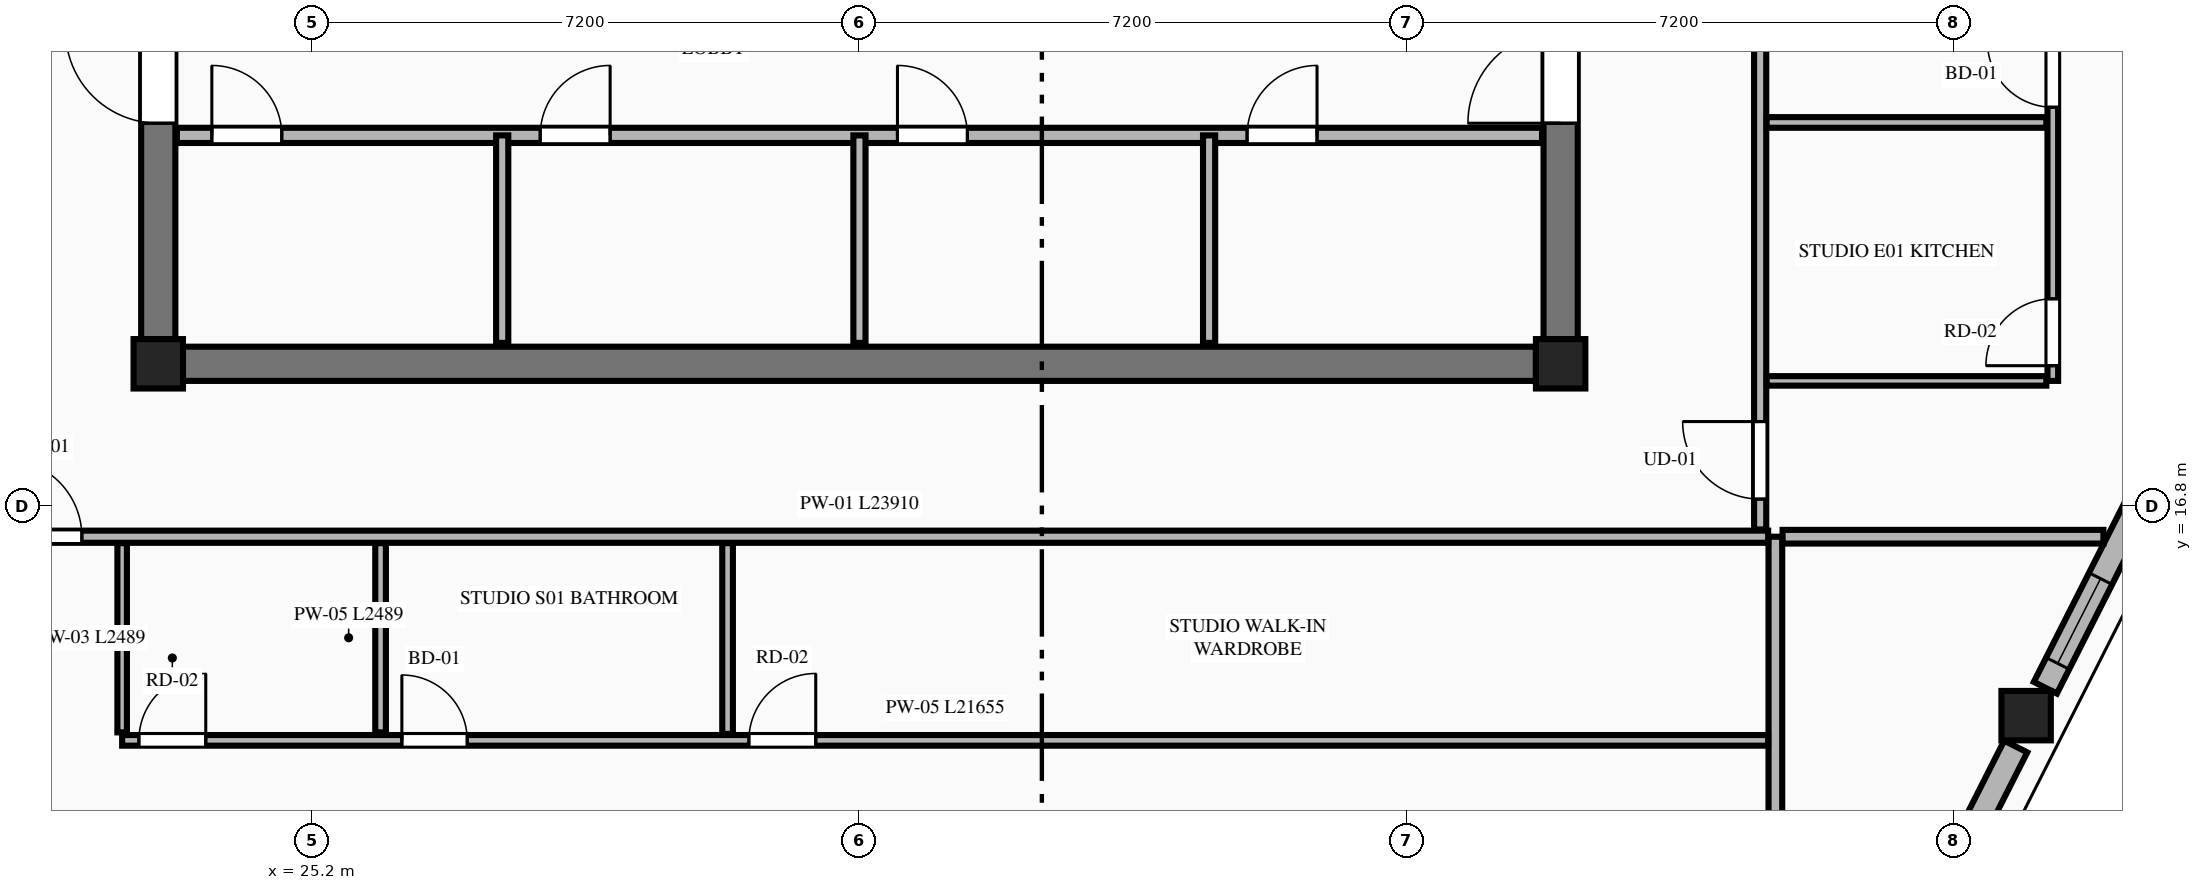
"""IFC4 building model, lengths in metres.
Left out: names, types, materials, properties, quantities, classifications, styles, units other than length and angle.
Written with IfcOpenShell. Run it as: python <this file> out.ifc"""

import sys

from ifc_helpers import new_model, si_unit, direction, frame, frame_2d, origin, origin_2d, place, context, subcontext, project, spatial, rectangle, extrude, element, fill, save


model = new_model("IFC4")
c1 = context("Model", 3, precision=1e-05, world=origin(), true_north=direction((0.0, 1.0)))
c2 = subcontext(c1, "Body", "Model", "MODEL_VIEW")
j1 = project(units=[si_unit("LENGTHUNIT", "METRE"), si_unit("PLANEANGLEUNIT", "RADIAN")], contexts=[c1])
p1 = place(None, origin())
s1 = spatial("IfcSite", under=j1, at=p1, CompositionType="ELEMENT")
p2 = place(p1, origin())
s2 = spatial("IfcBuilding", under=s1, at=p2, CompositionType="ELEMENT")
p3 = place(p2, frame((0.0, 0.0, 267.15)))
s3 = spatial("IfcBuildingStorey", under=s2, at=p3, CompositionType="ELEMENT", Elevation=267.15)
for number, where, z_axis, x_axis in (
    (1, (23.175, 18.675, 0.0), (0.0, 0.0, 1.0), (1.0, 0.0, 0.0)),
    (2, (41.625, 18.675, 0.0), (0.0, 0.0, 1.0), (1.0, 0.0, 0.0)),
):
    element("IfcColumn", number, at=place(p3, frame(where, z_axis=z_axis, x_axis=x_axis)), inside=s3, PredefinedType="COLUMN", context=c2, shape_type="SweptSolid", body=[
        extrude(rectangle(XDim=0.65, YDim=0.65, at=origin_2d()), origin(), (0.0, 0.0, 1.0), 3.65),
    ])
p4 = place(p3, frame((23.5, 18.675, 0.0), z_axis=(0.0, 0.0, 1.0), x_axis=(1.0, 0.0, 0.0)))
e3 = element("IfcWall", 3, at=p4, inside=s3, PredefinedType="SHEAR", context=c2, shape_type="SweptSolid", body=[
    extrude(rectangle(XDim=17.8, YDim=0.45, at=frame_2d((8.9, 0.0))), origin(), (0.0, 0.0, 1.0), 3.45),
])
p5 = place(p3, frame((23.175, 19.0, 0.0), z_axis=(0.0, 0.0, 1.0), x_axis=(0.0, 1.0, 0.0)))
e4 = element("IfcWall", 4, at=p5, inside=s3, PredefinedType="SHEAR", context=c2, shape_type="SweptSolid", body=[
    extrude(rectangle(XDim=13.8, YDim=0.45, at=frame_2d((6.9, 0.0))), origin(), (0.0, 0.0, 1.0), 3.45),
])
p6 = place(p5, frame((2.84, 0.0, 0.0)))
e5 = element("IfcOpeningElement", 5, at=p6, cuts=e4, PredefinedType="OPENING", context=c2, shape_type="SweptSolid", body=[
    extrude(rectangle(XDim=1.22, YDim=2.25, at=frame_2d((0.61, 1.125))), frame((0.0, 0.235, 0.0), z_axis=(0.0, -1.0, 0.0), x_axis=(1.0, 0.0, 0.0)), (0.0, 0.0, 1.0), 0.47),
])
p7 = place(p3, frame((41.625, 19.0, 0.0), z_axis=(0.0, 0.0, 1.0), x_axis=(0.0, 1.0, 0.0)))
e6 = element("IfcWall", 6, at=p7, inside=s3, PredefinedType="SHEAR", context=c2, shape_type="SweptSolid", body=[
    extrude(rectangle(XDim=13.8, YDim=0.45, at=frame_2d((6.9, 0.0))), origin(), (0.0, 0.0, 1.0), 3.45),
])
p8 = place(p7, frame((2.84, 0.0, 0.0)))
e7 = element("IfcOpeningElement", 7, at=p8, cuts=e6, PredefinedType="OPENING", context=c2, shape_type="SweptSolid", body=[
    extrude(rectangle(XDim=1.22, YDim=2.25, at=frame_2d((0.61, 1.125))), frame((0.0, 0.235, 0.0), z_axis=(0.0, -1.0, 0.0), x_axis=(1.0, 0.0, 0.0)), (0.0, 0.0, 1.0), 0.47),
])
p9 = place(p3, frame((47.749, 14.046, 0.0), z_axis=(0.0, 0.0, 1.0), x_axis=(1.0, 0.0, 0.0)))
e8 = element("IfcColumn", 8, at=p9, inside=s3, PredefinedType="COLUMN", context=c2, shape_type="SweptSolid", body=[
    extrude(rectangle(XDim=0.65, YDim=0.65, at=origin_2d()), origin(), (0.0, 0.0, 1.0), 3.65),
])
p10 = place(p3, frame((23.42, 21.68, 0.0), z_axis=(0.0, 0.0, 1.0), x_axis=(1.0, 0.0, 0.0)))
e9 = element("IfcWall", 9, at=p10, inside=s3, PredefinedType="PLUMBINGWALL", context=c2, shape_type="SweptSolid", body=[
    extrude(rectangle(XDim=17.96, YDim=0.2, at=frame_2d((8.98, 0.0))), origin(), (0.0, 0.0, 1.0), 3.45),
])
p11 = place(p10, frame((0.46, 0.0, 0.0)))
e10 = element("IfcOpeningElement", 10, at=p11, cuts=e9, PredefinedType="OPENING", context=c2, shape_type="SweptSolid", body=[
    extrude(rectangle(XDim=0.92, YDim=2.15, at=frame_2d((0.46, 1.075))), frame((0.0, 0.11, 0.0), z_axis=(0.0, -1.0, 0.0), x_axis=(1.0, 0.0, 0.0)), (0.0, 0.0, 1.0), 0.22),
])
p12 = place(p10, frame((4.78, 0.0, 0.0)))
e11 = element("IfcOpeningElement", 11, at=p12, cuts=e9, PredefinedType="OPENING", context=c2, shape_type="SweptSolid", body=[
    extrude(rectangle(XDim=0.92, YDim=2.15, at=frame_2d((0.46, 1.075))), frame((0.0, 0.11, 0.0), z_axis=(0.0, -1.0, 0.0), x_axis=(1.0, 0.0, 0.0)), (0.0, 0.0, 1.0), 0.22),
])
p13 = place(p10, frame((9.48, 0.0, 0.0)))
e12 = element("IfcOpeningElement", 12, at=p13, cuts=e9, PredefinedType="OPENING", context=c2, shape_type="SweptSolid", body=[
    extrude(rectangle(XDim=0.92, YDim=2.15, at=frame_2d((0.46, 1.075))), frame((0.0, 0.11, 0.0), z_axis=(0.0, -1.0, 0.0), x_axis=(1.0, 0.0, 0.0)), (0.0, 0.0, 1.0), 0.22),
])
p14 = place(p10, frame((14.08, 0.0, 0.0)))
e13 = element("IfcOpeningElement", 13, at=p14, cuts=e9, PredefinedType="OPENING", context=c2, shape_type="SweptSolid", body=[
    extrude(rectangle(XDim=0.92, YDim=2.15, at=frame_2d((0.46, 1.075))), frame((0.0, 0.11, 0.0), z_axis=(0.0, -1.0, 0.0), x_axis=(1.0, 0.0, 0.0)), (0.0, 0.0, 1.0), 0.22),
])
for number, where, z_axis, x_axis in (
    (14, (27.7, 18.95, 0.0), (0.0, 0.0, 1.0), (0.0, 1.0, 0.0)),
    (15, (32.4, 18.95, 0.0), (0.0, 0.0, 1.0), (0.0, 1.0, 0.0)),
    (16, (37.0, 18.95, 0.0), (0.0, 0.0, 1.0), (0.0, 1.0, 0.0)),
):
    element("IfcWall", number, at=place(p3, frame(where, z_axis=z_axis, x_axis=x_axis)), inside=s3, PredefinedType="PARTITIONING", context=c2, shape_type="SweptSolid", body=[
        extrude(rectangle(XDim=2.73, YDim=0.16, at=frame_2d((1.365, 0.0))), origin(), (0.0, 0.0, 1.0), 3.45),
    ])
p15 = place(p3, frame((45.556, 9.577, 0.0), z_axis=(0.0, 0.0, 1.0), x_axis=(0.45154039276, 0.892250678737, 0.0)))
e17 = element("IfcWall", 17, at=p15, inside=s3, PredefinedType="STANDARD", context=c2, shape_type="SweptSolid", body=[
    extrude(rectangle(XDim=4.554, YDim=0.34, at=frame_2d((2.277, 0.0))), origin(), (0.0, 0.0, 1.0), 2.983),
])
p16 = place(p15, frame((1.577, 0.0, 0.75)))
e18 = element("IfcOpeningElement", 18, at=p16, cuts=e17, PredefinedType="OPENING", context=c2, shape_type="SweptSolid", body=[
    extrude(rectangle(XDim=1.4, YDim=2.05, at=frame_2d((0.7, 1.025))), frame((0.0, 0.18, 0.0), z_axis=(0.0, -1.0, 0.0), x_axis=(1.0, 0.0, 0.0)), (0.0, 0.0, 1.0), 0.36),
])
p17 = place(p3, frame((48.002, 14.413, 0.0), z_axis=(0.0, 0.0, 1.0), x_axis=(0.451468341582, 0.892287137949, 0.0)))
e19 = element("IfcWall", 19, at=p17, inside=s3, PredefinedType="STANDARD", context=c2, shape_type="SweptSolid", body=[
    extrude(rectangle(XDim=4.723, YDim=0.34, at=frame_2d((2.361, 0.0))), origin(), (0.0, 0.0, 1.0), 2.983),
])
p18 = place(p17, frame((0.359, 0.0, 0.75)))
e20 = element("IfcOpeningElement", 20, at=p18, cuts=e19, PredefinedType="OPENING", context=c2, shape_type="SweptSolid", body=[
    extrude(rectangle(XDim=1.25, YDim=1.95, at=frame_2d((0.625, 0.975))), frame((0.0, 0.18, 0.0), z_axis=(0.0, -1.0, 0.0), x_axis=(1.0, 0.0, 0.0)), (0.0, 0.0, 1.0), 0.36),
])
p19 = place(p17, frame((2.946, 0.0, 0.75)))
e21 = element("IfcOpeningElement", 21, at=p19, cuts=e19, PredefinedType="OPENING", context=c2, shape_type="SweptSolid", body=[
    extrude(rectangle(XDim=1.1, YDim=2.0, at=frame_2d((0.55, 1.0))), frame((0.0, 0.18, 0.0), z_axis=(0.0, -1.0, 0.0), x_axis=(1.0, 0.0, 0.0)), (0.0, 0.0, 1.0), 0.36),
])
p20 = place(p3, frame((44.45, 8.119, 0.0), z_axis=(0.0, 0.0, 1.0), x_axis=(0.0, 1.0, 0.0)))
e22 = element("IfcWall", 22, at=p20, inside=s3, PredefinedType="PARTITIONING", context=c2, shape_type="SweptSolid", body=[
    extrude(rectangle(XDim=8.281, YDim=0.18, at=frame_2d((4.141, 0.0))), origin(), (0.0, 0.0, 1.0), 3.45),
])
p21 = place(p3, frame((20.445, 16.4, 0.0), z_axis=(0.0, 0.0, 1.0), x_axis=(1.0, 0.0, 0.0)))
e23 = element("IfcWall", 23, at=p21, inside=s3, PredefinedType="PARTITIONING", context=c2, shape_type="SweptSolid", body=[
    extrude(rectangle(XDim=23.91, YDim=0.16, at=frame_2d((11.955, 0.0))), origin(), (0.0, 0.0, 1.0), 3.45),
])
p22 = place(p21, frame((0.705, 0.0, 0.0)))
e24 = element("IfcOpeningElement", 24, at=p22, cuts=e23, PredefinedType="OPENING", context=c2, shape_type="SweptSolid", body=[
    extrude(rectangle(XDim=1.02, YDim=2.25, at=frame_2d((0.51, 1.125))), frame((0.0, 0.09, 0.0), z_axis=(0.0, -1.0, 0.0), x_axis=(1.0, 0.0, 0.0)), (0.0, 0.0, 1.0), 0.18),
])
p23 = place(p3, frame((22.7, 13.826, 0.0), z_axis=(0.0, 0.0, 1.0), x_axis=(0.0, 1.0, 0.0)))
e25 = element("IfcWall", 25, at=p23, inside=s3, PredefinedType="PARTITIONING", context=c2, shape_type="SweptSolid", body=[
    extrude(rectangle(XDim=2.489, YDim=0.125, at=frame_2d((1.245, 0.0))), origin(), (0.0, 0.0, 1.0), 2.907),
])
p24 = place(p3, frame((22.7, 13.721, 0.0), z_axis=(0.0, 0.0, 1.0), x_axis=(1.0, 0.0, 0.0)))
e26 = element("IfcWall", 26, at=p24, inside=s3, PredefinedType="PLUMBINGWALL", context=c2, shape_type="SweptSolid", body=[
    extrude(rectangle(XDim=21.655, YDim=0.14, at=frame_2d((10.828, 0.0))), origin(), (0.0, 0.0, 1.0), 3.45),
])
p25 = place(p24, frame((3.68, 0.0, 0.0)))
e27 = element("IfcOpeningElement", 27, at=p25, cuts=e26, PredefinedType="OPENING", context=c2, shape_type="SweptSolid", body=[
    extrude(rectangle(XDim=0.86, YDim=2.1, at=frame_2d((0.43, 1.05))), frame((0.0, 0.08, 0.0), z_axis=(0.0, -1.0, 0.0), x_axis=(1.0, 0.0, 0.0)), (0.0, 0.0, 1.0), 0.16),
])
p26 = place(p24, frame((8.245, 0.0, 0.0)))
e28 = element("IfcOpeningElement", 28, at=p26, cuts=e26, PredefinedType="OPENING", context=c2, shape_type="SweptSolid", body=[
    extrude(rectangle(XDim=0.88, YDim=2.15, at=frame_2d((0.44, 1.075))), frame((0.0, 0.08, 0.0), z_axis=(0.0, -1.0, 0.0), x_axis=(1.0, 0.0, 0.0)), (0.0, 0.0, 1.0), 0.16),
])
p27 = place(p24, frame((0.22, 0.0, 0.0)))
e29 = element("IfcOpeningElement", 29, at=p27, cuts=e26, PredefinedType="OPENING", context=c2, shape_type="SweptSolid", body=[
    extrude(rectangle(XDim=0.88, YDim=2.15, at=frame_2d((0.44, 1.075))), frame((0.0, 0.08, 0.0), z_axis=(0.0, -1.0, 0.0), x_axis=(1.0, 0.0, 0.0)), (0.0, 0.0, 1.0), 0.16),
])
p28 = place(p3, frame((26.1, 13.826, 0.0), z_axis=(0.0, 0.0, 1.0), x_axis=(0.0, 1.0, 0.0)))
e30 = element("IfcWall", 30, at=p28, inside=s3, PredefinedType="PLUMBINGWALL", context=c2, shape_type="SweptSolid", body=[
    extrude(rectangle(XDim=2.489, YDim=0.14, at=frame_2d((1.245, 0.0))), origin(), (0.0, 0.0, 1.0), 3.45),
])
p29 = place(p3, frame((30.665, 13.806, 0.0), z_axis=(0.0, 0.0, 1.0), x_axis=(0.0, 1.0, 0.0)))
e31 = element("IfcWall", 31, at=p29, inside=s3, PredefinedType="PLUMBINGWALL", context=c2, shape_type="SweptSolid", body=[
    extrude(rectangle(XDim=2.509, YDim=0.14, at=frame_2d((1.254, 0.0))), origin(), (0.0, 0.0, 1.0), 3.45),
])
p30 = place(p3, frame((44.545, 16.4, 0.0), z_axis=(0.0, 0.0, 1.0), x_axis=(1.0, 0.0, 0.0)))
e32 = element("IfcWall", 32, at=p30, inside=s3, PredefinedType="PARTITIONING", context=c2, shape_type="SweptSolid", body=[
    extrude(rectangle(XDim=4.221, YDim=0.18, at=frame_2d((2.111, 0.0))), origin(), (0.0, 0.0, 1.0), 3.45),
])
p31 = place(p3, frame((44.25, 16.495, 0.0), z_axis=(0.0, 0.0, 1.0), x_axis=(0.0, 1.0, 0.0)))
e33 = element("IfcWall", 33, at=p31, inside=s3, PredefinedType="PARTITIONING", context=c2, shape_type="SweptSolid", body=[
    extrude(rectangle(XDim=18.41, YDim=0.16, at=frame_2d((9.205, 0.0))), origin(), (0.0, 0.0, 1.0), 3.137),
])
p32 = place(p31, frame((0.4, 0.0, 0.0)))
e34 = element("IfcOpeningElement", 34, at=p32, cuts=e33, PredefinedType="OPENING", context=c2, shape_type="SweptSolid", body=[
    extrude(rectangle(XDim=1.02, YDim=2.25, at=frame_2d((0.51, 1.125))), frame((0.0, 0.09, 0.0), z_axis=(0.0, -1.0, 0.0), x_axis=(1.0, 0.0, 0.0)), (0.0, 0.0, 1.0), 0.18),
])
p33 = place(p3, frame((44.335, 18.45, 0.0), z_axis=(0.0, 0.0, 1.0), x_axis=(1.0, 0.0, 0.0)))
e35 = element("IfcWall", 35, at=p33, inside=s3, PredefinedType="PARTITIONING", context=c2, shape_type="SweptSolid", body=[
    extrude(rectangle(XDim=3.68, YDim=0.125, at=frame_2d((1.84, 0.0))), origin(), (0.0, 0.0, 1.0), 3.45),
])
p34 = place(p3, frame((48.1, 18.45, 0.0), z_axis=(0.0, 0.0, 1.0), x_axis=(0.0, 1.0, 0.0)))
e36 = element("IfcWall", 36, at=p34, inside=s3, PredefinedType="PLUMBINGWALL", context=c2, shape_type="SweptSolid", body=[
    extrude(rectangle(XDim=16.455, YDim=0.14, at=frame_2d((8.228, 0.0))), origin(), (0.0, 0.0, 1.0), 3.45),
])
p35 = place(p34, frame((3.6, 0.0, 0.0)))
e37 = element("IfcOpeningElement", 37, at=p35, cuts=e36, PredefinedType="OPENING", context=c2, shape_type="SweptSolid", body=[
    extrude(rectangle(XDim=0.86, YDim=2.1, at=frame_2d((0.43, 1.05))), frame((0.0, 0.08, 0.0), z_axis=(0.0, -1.0, 0.0), x_axis=(1.0, 0.0, 0.0)), (0.0, 0.0, 1.0), 0.16),
])
p36 = place(p34, frame((7.36, 0.0, 0.0)))
e38 = element("IfcOpeningElement", 38, at=p36, cuts=e36, PredefinedType="OPENING", context=c2, shape_type="SweptSolid", body=[
    extrude(rectangle(XDim=0.88, YDim=2.15, at=frame_2d((0.44, 1.075))), frame((0.0, 0.08, 0.0), z_axis=(0.0, -1.0, 0.0), x_axis=(1.0, 0.0, 0.0)), (0.0, 0.0, 1.0), 0.16),
])
p37 = place(p34, frame((0.2, 0.0, 0.0)))
e39 = element("IfcOpeningElement", 39, at=p37, cuts=e36, PredefinedType="OPENING", context=c2, shape_type="SweptSolid", body=[
    extrude(rectangle(XDim=0.88, YDim=2.15, at=frame_2d((0.44, 1.075))), frame((0.0, 0.08, 0.0), z_axis=(0.0, -1.0, 0.0), x_axis=(1.0, 0.0, 0.0)), (0.0, 0.0, 1.0), 0.16),
])
p38 = place(p3, frame((44.335, 21.85, 0.0), z_axis=(0.0, 0.0, 1.0), x_axis=(1.0, 0.0, 0.0)))
e40 = element("IfcWall", 40, at=p38, inside=s3, PredefinedType="PLUMBINGWALL", context=c2, shape_type="SweptSolid", body=[
    extrude(rectangle(XDim=3.68, YDim=0.14, at=frame_2d((1.84, 0.0))), origin(), (0.0, 0.0, 1.0), 3.45),
])
p39 = place(p6, origin())
e41 = element("IfcDoor", 41, at=p39, inside=s3, OperationType="SINGLE_SWING_RIGHT", PredefinedType="DOOR", context=c2, shape_type="SweptSolid", body=[
    extrude(rectangle(XDim=1.22, YDim=2.25, at=frame_2d((0.61, 1.125))), frame((0.0, 0.025, 0.0), z_axis=(0.0, -1.0, 0.0), x_axis=(1.0, 0.0, 0.0)), (0.0, 0.0, 1.0), 0.05),
])
fill(e5, e41)
p40 = place(p8, origin())
e42 = element("IfcDoor", 42, at=p40, inside=s3, OperationType="SINGLE_SWING_LEFT", PredefinedType="DOOR", context=c2, shape_type="SweptSolid", body=[
    extrude(rectangle(XDim=1.22, YDim=2.25, at=frame_2d((0.61, 1.125))), frame((0.0, 0.025, 0.0), z_axis=(0.0, -1.0, 0.0), x_axis=(1.0, 0.0, 0.0)), (0.0, 0.0, 1.0), 0.05),
])
fill(e7, e42)
p41 = place(p11, origin())
e43 = element("IfcDoor", 43, at=p41, inside=s3, OperationType="SINGLE_SWING_LEFT", PredefinedType="DOOR", context=c2, shape_type="SweptSolid", body=[
    extrude(rectangle(XDim=0.92, YDim=2.15, at=frame_2d((0.46, 1.075))), frame((0.0, 0.025, 0.0), z_axis=(0.0, -1.0, 0.0), x_axis=(1.0, 0.0, 0.0)), (0.0, 0.0, 1.0), 0.05),
])
fill(e10, e43)
p42 = place(p12, origin())
e44 = element("IfcDoor", 44, at=p42, inside=s3, OperationType="SINGLE_SWING_RIGHT", PredefinedType="DOOR", context=c2, shape_type="SweptSolid", body=[
    extrude(rectangle(XDim=0.92, YDim=2.15, at=frame_2d((0.46, 1.075))), frame((0.0, 0.025, 0.0), z_axis=(0.0, -1.0, 0.0), x_axis=(1.0, 0.0, 0.0)), (0.0, 0.0, 1.0), 0.05),
])
fill(e11, e44)
p43 = place(p13, origin())
e45 = element("IfcDoor", 45, at=p43, inside=s3, OperationType="SINGLE_SWING_LEFT", PredefinedType="DOOR", context=c2, shape_type="SweptSolid", body=[
    extrude(rectangle(XDim=0.92, YDim=2.15, at=frame_2d((0.46, 1.075))), frame((0.0, 0.025, 0.0), z_axis=(0.0, -1.0, 0.0), x_axis=(1.0, 0.0, 0.0)), (0.0, 0.0, 1.0), 0.05),
])
fill(e12, e45)
p44 = place(p14, origin())
e46 = element("IfcDoor", 46, at=p44, inside=s3, OperationType="SINGLE_SWING_RIGHT", PredefinedType="DOOR", context=c2, shape_type="SweptSolid", body=[
    extrude(rectangle(XDim=0.92, YDim=2.15, at=frame_2d((0.46, 1.075))), frame((0.0, 0.025, 0.0), z_axis=(0.0, -1.0, 0.0), x_axis=(1.0, 0.0, 0.0)), (0.0, 0.0, 1.0), 0.05),
])
fill(e13, e46)
p45 = place(p18, origin())
e47 = element("IfcWindow", 47, at=p45, inside=s3, PartitioningType="SINGLE_PANEL", PredefinedType="WINDOW", context=c2, shape_type="SweptSolid", body=[
    extrude(rectangle(XDim=1.25, YDim=1.95, at=frame_2d((0.625, 0.975))), frame((0.0, 0.03, 0.0), z_axis=(0.0, -1.0, 0.0), x_axis=(1.0, 0.0, 0.0)), (0.0, 0.0, 1.0), 0.06),
])
fill(e20, e47)
p46 = place(p25, origin())
e48 = element("IfcDoor", 48, at=p46, inside=s3, OperationType="SINGLE_SWING_LEFT", PredefinedType="DOOR", context=c2, shape_type="SweptSolid", body=[
    extrude(rectangle(XDim=0.86, YDim=2.1, at=frame_2d((0.43, 1.05))), frame((0.0, 0.025, 0.0), z_axis=(0.0, -1.0, 0.0), x_axis=(1.0, 0.0, 0.0)), (0.0, 0.0, 1.0), 0.05),
])
fill(e27, e48)
p47 = place(p26, origin())
e49 = element("IfcDoor", 49, at=p47, inside=s3, OperationType="SINGLE_SWING_RIGHT", PredefinedType="DOOR", context=c2, shape_type="SweptSolid", body=[
    extrude(rectangle(XDim=0.88, YDim=2.15, at=frame_2d((0.44, 1.075))), frame((0.0, 0.025, 0.0), z_axis=(0.0, -1.0, 0.0), x_axis=(1.0, 0.0, 0.0)), (0.0, 0.0, 1.0), 0.05),
])
fill(e28, e49)
p48 = place(p22, origin())
e50 = element("IfcDoor", 50, at=p48, inside=s3, OperationType="SINGLE_SWING_LEFT", PredefinedType="DOOR", context=c2, shape_type="SweptSolid", body=[
    extrude(rectangle(XDim=1.02, YDim=2.25, at=frame_2d((0.51, 1.125))), frame((0.0, 0.025, 0.0), z_axis=(0.0, -1.0, 0.0), x_axis=(1.0, 0.0, 0.0)), (0.0, 0.0, 1.0), 0.05),
])
fill(e24, e50)
p49 = place(p27, origin())
e51 = element("IfcDoor", 51, at=p49, inside=s3, OperationType="SINGLE_SWING_RIGHT", PredefinedType="DOOR", context=c2, shape_type="SweptSolid", body=[
    extrude(rectangle(XDim=0.88, YDim=2.15, at=frame_2d((0.44, 1.075))), frame((0.0, 0.025, 0.0), z_axis=(0.0, -1.0, 0.0), x_axis=(1.0, 0.0, 0.0)), (0.0, 0.0, 1.0), 0.05),
])
fill(e29, e51)
p50 = place(p35, origin())
e52 = element("IfcDoor", 52, at=p50, inside=s3, OperationType="SINGLE_SWING_RIGHT", PredefinedType="DOOR", context=c2, shape_type="SweptSolid", body=[
    extrude(rectangle(XDim=0.86, YDim=2.1, at=frame_2d((0.43, 1.05))), frame((0.0, 0.025, 0.0), z_axis=(0.0, -1.0, 0.0), x_axis=(1.0, 0.0, 0.0)), (0.0, 0.0, 1.0), 0.05),
])
fill(e37, e52)
p51 = place(p32, origin())
e53 = element("IfcDoor", 53, at=p51, inside=s3, OperationType="SINGLE_SWING_RIGHT", PredefinedType="DOOR", context=c2, shape_type="SweptSolid", body=[
    extrude(rectangle(XDim=1.02, YDim=2.25, at=frame_2d((0.51, 1.125))), frame((0.0, 0.025, 0.0), z_axis=(0.0, -1.0, 0.0), x_axis=(1.0, 0.0, 0.0)), (0.0, 0.0, 1.0), 0.05),
])
fill(e34, e53)
p52 = place(p37, origin())
e54 = element("IfcDoor", 54, at=p52, inside=s3, OperationType="SINGLE_SWING_LEFT", PredefinedType="DOOR", context=c2, shape_type="SweptSolid", body=[
    extrude(rectangle(XDim=0.88, YDim=2.15, at=frame_2d((0.44, 1.075))), frame((0.0, 0.025, 0.0), z_axis=(0.0, -1.0, 0.0), x_axis=(1.0, 0.0, 0.0)), (0.0, 0.0, 1.0), 0.05),
])
fill(e39, e54)
save(model, sys.argv[1])
